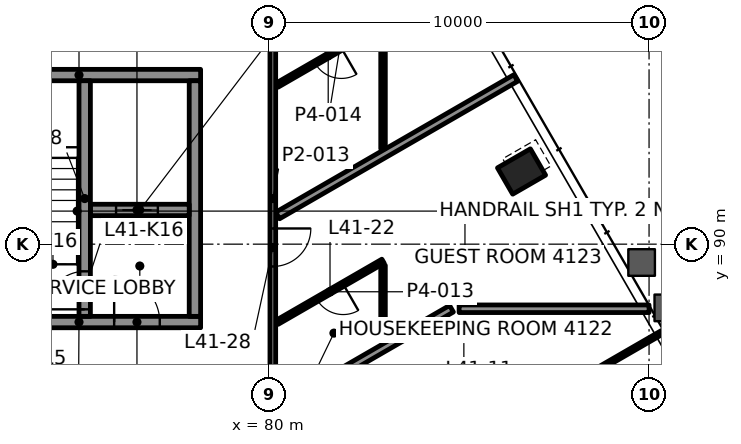
"""IFC4 building model, lengths in metres.
Left out: names, types, materials, properties, quantities, classifications, styles, units other than length and angle.
Written with IfcOpenShell. Run it as: python <this file> out.ifc"""

import sys

from ifc_helpers import new_model, si_unit, direction, frame, frame_2d, origin, origin_2d, place, context, subcontext, project, spatial, rectangle, hollow_rectangle, extrude, element, fill, save


model = new_model("IFC4")
c1 = context("Model", 3, precision=1e-05, world=origin(), true_north=direction((0.0, 1.0)))
c2 = subcontext(c1, "Body", "Model", "MODEL_VIEW")
j1 = project(units=[si_unit("LENGTHUNIT", "METRE"), si_unit("PLANEANGLEUNIT", "RADIAN")], contexts=[c1])
p1 = place(None, origin())
s1 = spatial("IfcSite", under=j1, at=p1, CompositionType="ELEMENT")
p2 = place(p1, origin())
s2 = spatial("IfcBuilding", under=s1, at=p2, CompositionType="ELEMENT")
p3 = place(p2, frame((0.0, 0.0, 179.2)))
s3 = spatial("IfcBuildingStorey", under=s2, at=p3, CompositionType="ELEMENT", Elevation=179.2)
p4 = place(p3, frame((86.645, 91.912, -0.0), z_axis=(0.0, 0.0, 1.0), x_axis=(-0.5, 0.866025403784, 0.0)))
e1 = element("IfcColumn", 1, at=p4, inside=s3, PredefinedType="COLUMN", context=c2, shape_type="SweptSolid", body=[
    extrude(hollow_rectangle(XDim=0.8, YDim=1.0, WallThickness=0.05, at=origin_2d()), origin(), (0.0, 0.0, 1.0), 3.9),
])
p5 = place(p3, frame((71.8, 87.95, 0.0), z_axis=(0.0, 0.0, 1.0), x_axis=(1.0, 0.0, 0.0)))
e2 = element("IfcWall", 2, at=p5, inside=s3, PredefinedType="SHEAR", context=c2, shape_type="SweptSolid", body=[
    extrude(rectangle(XDim=6.4, YDim=0.3, at=frame_2d((3.2, 0.0))), origin(), (0.0, 0.0, 1.0), 3.7),
])
p6 = place(p5, frame((1.325, 0.0, 0.0)))
e3 = element("IfcOpeningElement", 3, at=p6, cuts=e2, PredefinedType="OPENING", context=c2, shape_type="SweptSolid", body=[
    extrude(rectangle(XDim=1.0, YDim=2.1, at=frame_2d((0.5, 1.05))), frame((0.0, 0.16, 0.0), z_axis=(0.0, -1.0, 0.0), x_axis=(1.0, 0.0, 0.0)), (0.0, 0.0, 1.0), 0.32),
])
p7 = place(p5, frame((4.125, 0.0, 0.0)))
e4 = element("IfcOpeningElement", 4, at=p7, cuts=e2, PredefinedType="OPENING", context=c2, shape_type="SweptSolid", body=[
    extrude(rectangle(XDim=1.2, YDim=2.1, at=frame_2d((0.6, 1.05))), frame((0.0, 0.16, 0.0), z_axis=(0.0, -1.0, 0.0), x_axis=(1.0, 0.0, 0.0)), (0.0, 0.0, 1.0), 0.32),
])
p8 = place(p3, frame((71.8, 94.45, 0.0), z_axis=(0.0, 0.0, 1.0), x_axis=(1.0, 0.0, 0.0)))
e5 = element("IfcWall", 5, at=p8, inside=s3, PredefinedType="SHEAR", context=c2, shape_type="SweptSolid", body=[
    extrude(rectangle(XDim=6.4, YDim=0.3, at=frame_2d((3.2, 0.0))), origin(), (0.0, 0.0, 1.0), 3.7),
])
p9 = place(p3, frame((78.05, 88.1, 0.0), z_axis=(0.0, 0.0, 1.0), x_axis=(0.0, 1.0, 0.0)))
e6 = element("IfcWall", 6, at=p9, inside=s3, PredefinedType="SHEAR", context=c2, shape_type="SweptSolid", body=[
    extrude(rectangle(XDim=6.2, YDim=0.3, at=frame_2d((3.1, 0.0))), origin(), (0.0, 0.0, 1.0), 3.7),
])
p10 = place(p3, frame((75.3, 90.9, 0.0), z_axis=(0.0, 0.0, 1.0), x_axis=(1.0, 0.0, 0.0)))
e7 = element("IfcWall", 7, at=p10, inside=s3, PredefinedType="SHEAR", context=c2, shape_type="SweptSolid", body=[
    extrude(rectangle(XDim=2.6, YDim=0.3, at=frame_2d((1.3, 0.0))), origin(), (0.0, 0.0, 1.0), 3.7),
])
p11 = place(p10, frame((0.675, 0.0, 0.0)))
e8 = element("IfcOpeningElement", 8, at=p11, cuts=e7, PredefinedType="OPENING", context=c2, shape_type="SweptSolid", body=[
    extrude(rectangle(XDim=1.1, YDim=2.1, at=frame_2d((0.55, 1.05))), frame((0.0, 0.16, 0.0), z_axis=(0.0, -1.0, 0.0), x_axis=(1.0, 0.0, 0.0)), (0.0, 0.0, 1.0), 0.32),
])
p12 = place(p3, frame((75.15, 88.1, 0.0), z_axis=(0.0, 0.0, 1.0), x_axis=(0.0, 1.0, 0.0)))
e9 = element("IfcWall", 9, at=p12, inside=s3, PredefinedType="SHEAR", context=c2, shape_type="SweptSolid", body=[
    extrude(rectangle(XDim=6.2, YDim=0.3, at=frame_2d((3.1, 0.0))), origin(), (0.0, 0.0, 1.0), 3.7),
])
p13 = place(p12, frame((0.185, 0.0, 0.0)))
e10 = element("IfcOpeningElement", 10, at=p13, cuts=e9, PredefinedType="OPENING", context=c2, shape_type="SweptSolid", body=[
    extrude(rectangle(XDim=1.0, YDim=2.1, at=frame_2d((0.5, 1.05))), frame((0.0, 0.16, 0.0), z_axis=(0.0, -1.0, 0.0), x_axis=(1.0, 0.0, 0.0)), (0.0, 0.0, 1.0), 0.32),
])
p14 = place(p3, frame((83.06, 87.8, 0.0), z_axis=(0.0, 0.0, 1.0), x_axis=(1.0, 0.0, 0.0)))
e11 = element("IfcWall", 11, at=p14, inside=s3, PredefinedType="PARTITIONING", context=c2, shape_type="SweptSolid", body=[
    extrude(rectangle(XDim=0.564, YDim=0.12, at=frame_2d((0.282, 0.0))), origin(), (0.0, 0.0, 1.0), 3.1),
])
p15 = place(p3, frame((85.002, 88.3, 0.0), z_axis=(0.0, 0.0, 1.0), x_axis=(1.0, 0.0, 0.0)))
e12 = element("IfcWall", 12, at=p15, inside=s3, PredefinedType="PARTITIONING", context=c2, shape_type="SweptSolid", body=[
    extrude(rectangle(XDim=4.998, YDim=0.2, at=frame_2d((2.499, 0.0))), origin(), (0.0, 0.0, 1.0), 3.022),
])
p16 = place(p3, frame((85.737, 85.02, 0.0), z_axis=(0.0, 0.0, 1.0), x_axis=(0.8660338432, 0.499985382219, 0.0)))
e13 = element("IfcWall", 13, at=p16, inside=s3, PredefinedType="PARTITIONING", context=c2, shape_type="SweptSolid", body=[
    extrude(rectangle(XDim=5.332, YDim=0.1, at=frame_2d((2.666, 0.0))), origin(), (0.0, 0.0, 1.0), 3.022),
])
p17 = place(p3, frame((79.197, 85.065, 0.0), z_axis=(0.0, 0.0, 1.0), x_axis=(0.86602410867, 0.500002243197, 0.0)))
e14 = element("IfcWall", 14, at=p17, inside=s3, PredefinedType="PARTITIONING", context=c2, shape_type="SweptSolid", body=[
    extrude(rectangle(XDim=6.471, YDim=0.2, at=frame_2d((3.235, 0.0))), origin(), (0.0, 0.0, 1.0), 3.1),
])
p18 = place(p3, frame((83.0, 89.553, 0.0), z_axis=(0.0, 0.0, 1.0), x_axis=(-0.86604299788, -0.499969524894, 0.0)))
e15 = element("IfcWall", 15, at=p18, inside=s3, PredefinedType="PARTITIONING", context=c2, shape_type="SweptSolid", body=[
    extrude(rectangle(XDim=3.222, YDim=0.12, at=frame_2d((1.611, 0.0))), origin(), (0.0, 0.0, 1.0), 3.1),
])
p19 = place(p18, frame((1.211, 0.0, 0.0)))
e16 = element("IfcOpeningElement", 16, at=p19, cuts=e15, PredefinedType="OPENING", context=c2, shape_type="SweptSolid", body=[
    extrude(rectangle(XDim=0.8, YDim=2.1, at=frame_2d((0.4, 1.05))), frame((0.0, 0.07, 0.0), z_axis=(0.0, -1.0, 0.0), x_axis=(1.0, 0.0, 0.0)), (0.0, 0.0, 1.0), 0.14),
])
p20 = place(p3, frame((80.227, 90.754, 0.0), z_axis=(0.0, 0.0, 1.0), x_axis=(0.866019288795, 0.500010591322, 0.0)))
e17 = element("IfcWall", 17, at=p20, inside=s3, PredefinedType="PARTITIONING", context=c2, shape_type="SweptSolid", body=[
    extrude(rectangle(XDim=7.237, YDim=0.2, at=frame_2d((3.618, 0.0))), origin(), (0.0, 0.0, 1.0), 3.022),
])
p21 = place(p3, frame((82.905, 95.739, 0.0), z_axis=(0.0, 0.0, 1.0), x_axis=(-0.866028856698, -0.499994019331, 0.0)))
e18 = element("IfcWall", 18, at=p21, inside=s3, PredefinedType="PARTITIONING", context=c2, shape_type="SweptSolid", body=[
    extrude(rectangle(XDim=3.113, YDim=0.12, at=frame_2d((1.556, 0.0))), origin(), (0.0, 0.0, 1.0), 3.1),
])
p22 = place(p21, frame((1.156, 0.0, 0.0)))
e19 = element("IfcOpeningElement", 19, at=p22, cuts=e18, PredefinedType="OPENING", context=c2, shape_type="SweptSolid", body=[
    extrude(rectangle(XDim=0.8, YDim=2.1, at=frame_2d((0.4, 1.05))), frame((0.0, 0.07, 0.0), z_axis=(0.0, -1.0, 0.0), x_axis=(1.0, 0.0, 0.0)), (0.0, 0.0, 1.0), 0.14),
])
p23 = place(p3, frame((83.0, 87.8, 0.0), z_axis=(0.0, 0.0, 1.0), x_axis=(0.0, 1.0, 0.0)))
e20 = element("IfcWall", 20, at=p23, inside=s3, PredefinedType="PARTITIONING", context=c2, shape_type="SweptSolid", body=[
    extrude(rectangle(XDim=1.644, YDim=0.12, at=frame_2d((0.822, 0.0))), origin(), (0.0, 0.0, 1.0), 3.1),
])
p24 = place(p3, frame((83.0, 92.51, 0.0), z_axis=(0.0, 0.0, 1.0), x_axis=(0.0, 1.0, 0.0)))
e21 = element("IfcWall", 21, at=p24, inside=s3, PredefinedType="PARTITIONING", context=c2, shape_type="SweptSolid", body=[
    extrude(rectangle(XDim=3.283, YDim=0.12, at=frame_2d((1.642, 0.0))), origin(), (0.0, 0.0, 1.0), 3.1),
])
p25 = place(p3, frame((80.1, 96.5, 0.0), z_axis=(0.0, 0.0, 1.0), x_axis=(0.0, -1.0, 0.0)))
e22 = element("IfcWall", 22, at=p25, inside=s3, PredefinedType="PARTITIONING", context=c2, shape_type="SweptSolid", body=[
    extrude(rectangle(XDim=10.6, YDim=0.15, at=frame_2d((5.3, 0.0))), origin(), (0.0, 0.0, 1.0), 3.022),
])
p26 = place(p25, frame((0.377, 0.0, 0.0)))
e23 = element("IfcOpeningElement", 23, at=p26, cuts=e22, PredefinedType="OPENING", context=c2, shape_type="SweptSolid", body=[
    extrude(rectangle(XDim=1.0, YDim=2.1, at=frame_2d((0.5, 1.05))), frame((0.0, 0.085, 0.0), z_axis=(0.0, -1.0, 0.0), x_axis=(1.0, 0.0, 0.0)), (0.0, 0.0, 1.0), 0.17),
])
p27 = place(p25, frame((6.087, 0.0, 0.0)))
e24 = element("IfcOpeningElement", 24, at=p27, cuts=e22, PredefinedType="OPENING", context=c2, shape_type="SweptSolid", body=[
    extrude(rectangle(XDim=1.0, YDim=2.1, at=frame_2d((0.5, 1.05))), frame((0.0, 0.085, 0.0), z_axis=(0.0, -1.0, 0.0), x_axis=(1.0, 0.0, 0.0)), (0.0, 0.0, 1.0), 0.17),
])
p28 = place(p19, origin())
e25 = element("IfcDoor", 25, at=p28, inside=s3, OperationType="SINGLE_SWING_RIGHT", PredefinedType="DOOR", context=c2, shape_type="SweptSolid", body=[
    extrude(rectangle(XDim=0.8, YDim=2.1, at=frame_2d((0.4, 1.05))), frame((0.0, 0.025, 0.0), z_axis=(0.0, -1.0, 0.0), x_axis=(1.0, 0.0, 0.0)), (0.0, 0.0, 1.0), 0.05),
])
fill(e16, e25)
p29 = place(p22, origin())
e26 = element("IfcDoor", 26, at=p29, inside=s3, OperationType="SINGLE_SWING_RIGHT", PredefinedType="DOOR", context=c2, shape_type="SweptSolid", body=[
    extrude(rectangle(XDim=0.8, YDim=2.1, at=frame_2d((0.4, 1.05))), frame((0.0, 0.025, 0.0), z_axis=(0.0, -1.0, 0.0), x_axis=(1.0, 0.0, 0.0)), (0.0, 0.0, 1.0), 0.05),
])
fill(e19, e26)
p30 = place(p27, origin())
e27 = element("IfcDoor", 27, at=p30, inside=s3, OperationType="SINGLE_SWING_LEFT", PredefinedType="DOOR", context=c2, shape_type="SweptSolid", body=[
    extrude(rectangle(XDim=1.0, YDim=2.1, at=frame_2d((0.5, 1.05))), frame((0.0, 0.025, 0.0), z_axis=(0.0, -1.0, 0.0), x_axis=(1.0, 0.0, 0.0)), (0.0, 0.0, 1.0), 0.05),
])
fill(e24, e27)
p31 = place(p11, origin())
e28 = element("IfcDoor", 28, at=p31, inside=s3, OperationType="DOUBLE_DOOR_SLIDING", PredefinedType="DOOR", context=c2, shape_type="SweptSolid", body=[
    extrude(rectangle(XDim=1.1, YDim=2.1, at=frame_2d((0.55, 1.05))), frame((0.0, 0.025, 0.0), z_axis=(0.0, -1.0, 0.0), x_axis=(1.0, 0.0, 0.0)), (0.0, 0.0, 1.0), 0.05),
])
fill(e8, e28)
p32 = place(p13, origin())
e29 = element("IfcDoor", 29, at=p32, inside=s3, OperationType="SINGLE_SWING_LEFT", PredefinedType="DOOR", context=c2, shape_type="SweptSolid", body=[
    extrude(rectangle(XDim=1.0, YDim=2.1, at=frame_2d((0.5, 1.05))), frame((0.0, 0.025, 0.0), z_axis=(0.0, -1.0, 0.0), x_axis=(1.0, 0.0, 0.0)), (0.0, 0.0, 1.0), 0.05),
])
fill(e10, e29)
p33 = place(p7, origin())
e30 = element("IfcDoor", 30, at=p33, inside=s3, OperationType="SINGLE_SWING_RIGHT", PredefinedType="DOOR", context=c2, shape_type="SweptSolid", body=[
    extrude(rectangle(XDim=1.2, YDim=2.1, at=frame_2d((0.6, 1.05))), frame((0.0, 0.025, 0.0), z_axis=(0.0, -1.0, 0.0), x_axis=(1.0, 0.0, 0.0)), (0.0, 0.0, 1.0), 0.05),
])
fill(e4, e30)
save(model, sys.argv[1])
